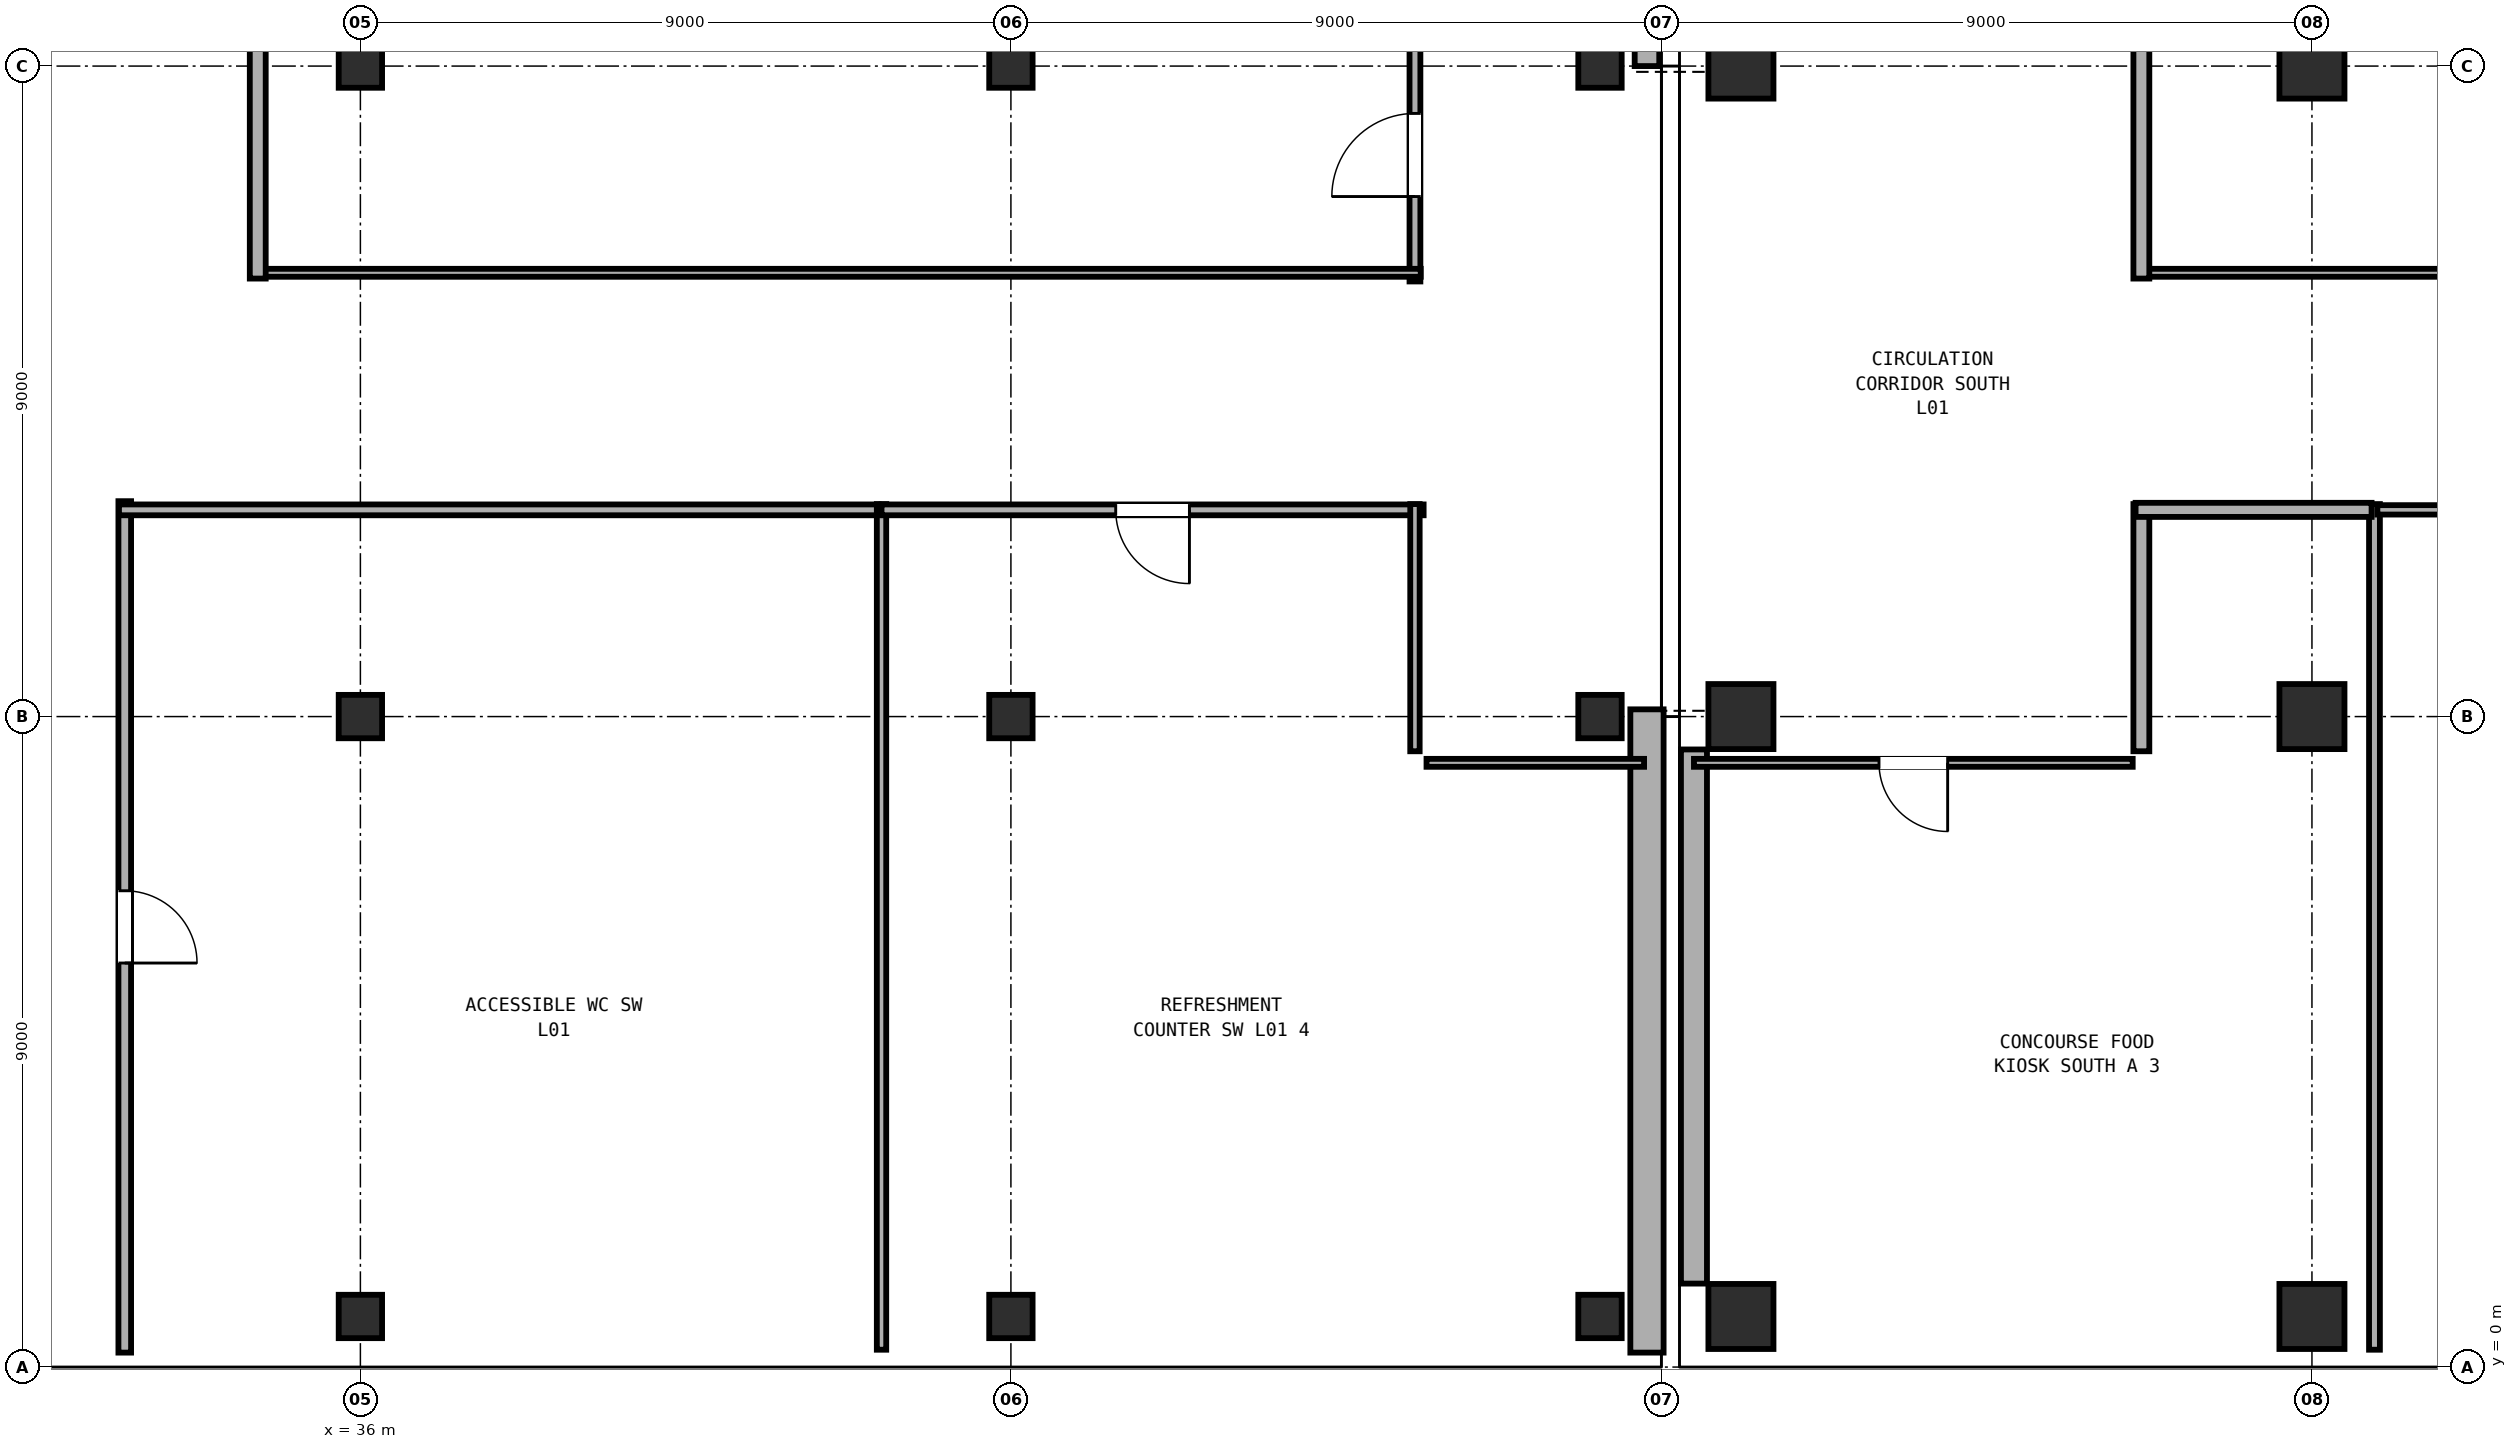
"""IFC4 building model, lengths in metres.
Left out: names, types, materials, properties, quantities, classifications, styles, units other than length and angle.
Written with IfcOpenShell. Run it as: python <this file> out.ifc"""

import sys

from ifc_helpers import new_model, si_unit, direction, frame, frame_2d, origin, origin_2d, place, context, subcontext, project, spatial, rectangle, extrude, element, fill, save


model = new_model("IFC4")
c1 = context("Model", 3, precision=1e-05, world=origin(), true_north=direction((0.0, 1.0)))
c2 = subcontext(c1, "Body", "Model", "MODEL_VIEW")
j1 = project(units=[si_unit("LENGTHUNIT", "METRE"), si_unit("PLANEANGLEUNIT", "RADIAN")], contexts=[c1])
p1 = place(None, origin())
s1 = spatial("IfcSite", under=j1, at=p1, CompositionType="ELEMENT")
p2 = place(p1, origin())
s2 = spatial("IfcBuilding", under=s1, at=p2, CompositionType="ELEMENT")
p3 = place(p2, frame((0.0, 0.0, 4.8)))
s3 = spatial("IfcBuildingStorey", under=s2, at=p3, CompositionType="ELEMENT", Elevation=4.8)
for number, where, z_axis, x_axis in (
    (1, (55.1, 0.7, 0.0), (0.0, 0.0, 1.0), (1.0, 0.0, 0.0)),
    (2, (55.1, 9.0, 0.0), (0.0, 0.0, 1.0), (1.0, 0.0, 0.0)),
    (3, (55.1, 18.0, 0.0), (0.0, 0.0, 1.0), (1.0, 0.0, 0.0)),
    (4, (63.0, 0.7, 0.0), (0.0, 0.0, 1.0), (1.0, 0.0, 0.0)),
    (5, (63.0, 9.0, 0.0), (0.0, 0.0, 1.0), (1.0, 0.0, 0.0)),
    (6, (63.0, 18.0, 0.0), (0.0, 0.0, 1.0), (1.0, 0.0, 0.0)),
):
    element("IfcColumn", number, at=place(p3, frame(where, z_axis=z_axis, x_axis=x_axis)), inside=s3, PredefinedType="COLUMN", context=c2, shape_type="SweptSolid", body=[
        extrude(rectangle(XDim=0.9, YDim=0.9, at=origin_2d()), origin(), (0.0, 0.0, 1.0), 4.8),
    ])
for number, where, z_axis, x_axis in (
    (7, (36.0, 0.7, 0.0), (0.0, 0.0, 1.0), (1.0, 0.0, 0.0)),
    (8, (36.0, 9.0, 0.0), (0.0, 0.0, 1.0), (1.0, 0.0, 0.0)),
    (9, (36.0, 18.0, 0.0), (0.0, 0.0, 1.0), (1.0, 0.0, 0.0)),
    (10, (45.0, 0.7, 0.0), (0.0, 0.0, 1.0), (1.0, 0.0, 0.0)),
    (11, (45.0, 9.0, 0.0), (0.0, 0.0, 1.0), (1.0, 0.0, 0.0)),
    (12, (45.0, 18.0, 0.0), (0.0, 0.0, 1.0), (1.0, 0.0, 0.0)),
    (13, (53.15, 0.7, 0.0), (0.0, 0.0, 1.0), (1.0, 0.0, 0.0)),
    (14, (53.15, 9.0, 0.0), (0.0, 0.0, 1.0), (1.0, 0.0, 0.0)),
    (15, (53.15, 18.0, 0.0), (0.0, 0.0, 1.0), (1.0, 0.0, 0.0)),
):
    element("IfcColumn", number, at=place(p3, frame(where, z_axis=z_axis, x_axis=x_axis)), inside=s3, PredefinedType="COLUMN", context=c2, shape_type="SweptSolid", body=[
        extrude(rectangle(XDim=0.6, YDim=0.6, at=origin_2d()), origin(), (0.0, 0.0, 1.0), 4.8),
    ])
p4 = place(p3, frame((54.45, 1.155, 0.0), z_axis=(0.0, 0.0, 1.0), x_axis=(0.0, 1.0, 0.0)))
e16 = element("IfcWall", 16, at=p4, inside=s3, PredefinedType="SOLIDWALL", context=c2, shape_type="SweptSolid", body=[
    extrude(rectangle(XDim=7.39, YDim=0.36, at=frame_2d((3.695, 0.0))), origin(), (0.0, 0.0, 1.0), 3.28),
])
p5 = place(p3, frame((71.545, 0.2, 0.0), z_axis=(0.0, 0.0, 1.0), x_axis=(-1.0, 0.0, 0.0)))
e17 = element("IfcWall", 17, at=p5, inside=s3, PredefinedType="SOLIDWALL", context=c2, shape_type="SweptSolid", body=[
    extrude(rectangle(XDim=8.09, YDim=0.4, at=frame_2d((4.045, 0.0))), origin(), (0.0, 0.0, 1.0), 3.58),
])
p6 = place(p5, frame((3.22, 0.0, 0.9)))
e18 = element("IfcOpeningElement", 18, at=p6, cuts=e17, PredefinedType="OPENING", context=c2, shape_type="SweptSolid", body=[
    extrude(rectangle(XDim=1.65, YDim=1.9, at=frame_2d((0.825, 0.95))), frame((0.0, 0.21, 0.0), z_axis=(0.0, -1.0, 0.0), x_axis=(1.0, 0.0, 0.0)), (0.0, 0.0, 1.0), 0.42),
])
p7 = place(p3, frame((62.545, 0.2, 0.0), z_axis=(0.0, 0.0, 1.0), x_axis=(-1.0, 0.0, 0.0)))
e19 = element("IfcWall", 19, at=p7, inside=s3, PredefinedType="SOLIDWALL", context=c2, shape_type="SweptSolid", body=[
    extrude(rectangle(XDim=6.99, YDim=0.38, at=frame_2d((3.495, 0.0))), origin(), (0.0, 0.0, 1.0), 3.58),
])
p8 = place(p7, frame((2.57, 0.0, 0.9)))
e20 = element("IfcOpeningElement", 20, at=p8, cuts=e19, PredefinedType="OPENING", context=c2, shape_type="SweptSolid", body=[
    extrude(rectangle(XDim=1.85, YDim=1.95, at=frame_2d((0.925, 0.975))), frame((0.0, 0.2, 0.0), z_axis=(0.0, -1.0, 0.0), x_axis=(1.0, 0.0, 0.0)), (0.0, 0.0, 1.0), 0.4),
])
p9 = place(p3, frame((53.8, 26.9, 0.0), z_axis=(0.0, 0.0, 1.0), x_axis=(0.0, -1.0, 0.0)))
e21 = element("IfcWall", 21, at=p9, inside=s3, PredefinedType="SOLIDWALL", context=c2, shape_type="SweptSolid", body=[
    extrude(rectangle(XDim=8.9, YDim=0.34, at=frame_2d((4.45, 0.0))), origin(), (0.0, 0.0, 1.0), 3.28),
])
p10 = place(p3, frame((53.8, 9.1, 0.0), z_axis=(0.0, 0.0, 1.0), x_axis=(0.0, -1.0, 0.0)))
e22 = element("IfcWall", 22, at=p10, inside=s3, PredefinedType="SOLIDWALL", context=c2, shape_type="SweptSolid", body=[
    extrude(rectangle(XDim=8.9, YDim=0.46, at=frame_2d((4.45, 0.0))), origin(), (0.0, 0.0, 1.0), 3.28),
])
p11 = place(p3, frame((52.845, 0.2, 0.0), z_axis=(0.0, 0.0, 1.0), x_axis=(-1.0, 0.0, 0.0)))
e23 = element("IfcWall", 23, at=p11, inside=s3, PredefinedType="SOLIDWALL", context=c2, shape_type="SweptSolid", body=[
    extrude(rectangle(XDim=7.54, YDim=0.42, at=frame_2d((3.77, 0.0))), origin(), (0.0, 0.0, 1.0), 3.28),
])
p12 = place(p3, frame((44.695, 0.2, 0.0), z_axis=(0.0, 0.0, 1.0), x_axis=(-1.0, 0.0, 0.0)))
e24 = element("IfcWall", 24, at=p12, inside=s3, PredefinedType="SOLIDWALL", context=c2, shape_type="SweptSolid", body=[
    extrude(rectangle(XDim=8.39, YDim=0.4, at=frame_2d((4.195, 0.0))), origin(), (0.0, 0.0, 1.0), 3.28),
])
p13 = place(p3, frame((35.695, 0.2, 0.0), z_axis=(0.0, 0.0, 1.0), x_axis=(-1.0, 0.0, 0.0)))
e25 = element("IfcWall", 25, at=p13, inside=s3, PredefinedType="SOLIDWALL", context=c2, shape_type="SweptSolid", body=[
    extrude(rectangle(XDim=8.39, YDim=0.38, at=frame_2d((4.195, 0.0))), origin(), (0.0, 0.0, 1.0), 3.58),
])
p14 = place(p13, frame((3.57, 0.0, 0.9)))
e26 = element("IfcOpeningElement", 26, at=p14, cuts=e25, PredefinedType="OPENING", context=c2, shape_type="SweptSolid", body=[
    extrude(rectangle(XDim=1.25, YDim=1.8, at=frame_2d((0.625, 0.9))), frame((0.0, 0.2, 0.0), z_axis=(0.0, -1.0, 0.0), x_axis=(1.0, 0.0, 0.0)), (0.0, 0.0, 1.0), 0.4),
])
p15 = place(p3, frame((73.24, 15.14, 0.0), z_axis=(0.0, 0.0, 1.0), x_axis=(-1.0, 0.0, 0.0)))
e27 = element("IfcWall", 27, at=p15, inside=s3, PredefinedType="PARTITIONING", context=c2, shape_type="SweptSolid", body=[
    extrude(rectangle(XDim=12.68, YDim=0.11, at=frame_2d((6.34, 0.0))), origin(), (0.0, 0.0, 1.0), 3.28),
])
p16 = place(p3, frame((60.64, 15.06, 0.0), z_axis=(0.0, 0.0, 1.0), x_axis=(0.0, 1.0, 0.0)))
e28 = element("IfcWall", 28, at=p16, inside=s3, PredefinedType="PARTITIONING", context=c2, shape_type="SweptSolid", body=[
    extrude(rectangle(XDim=20.7, YDim=0.22, at=frame_2d((10.35, 0.0))), origin(), (0.0, 0.0, 1.0), 3.28),
])
p17 = place(p3, frame((63.865, 0.24, 0.0), z_axis=(0.0, 0.0, 1.0), x_axis=(0.0, 1.0, 0.0)))
e29 = element("IfcWall", 29, at=p17, inside=s3, PredefinedType="PARTITIONING", context=c2, shape_type="SweptSolid", body=[
    extrude(rectangle(XDim=11.7, YDim=0.15, at=frame_2d((5.85, 0.0))), origin(), (0.0, 0.0, 1.0), 3.28),
])
p18 = place(p3, frame((63.905, 11.86, 0.0), z_axis=(0.0, 0.0, 1.0), x_axis=(1.0, 0.0, 0.0)))
e30 = element("IfcWall", 30, at=p18, inside=s3, PredefinedType="PARTITIONING", context=c2, shape_type="SweptSolid", body=[
    extrude(rectangle(XDim=9.335, YDim=0.13, at=frame_2d((4.667, 0.0))), origin(), (0.0, 0.0, 1.0), 3.28),
])
p19 = place(p3, frame((60.52, 8.36, 0.0), z_axis=(0.0, 0.0, 1.0), x_axis=(-1.0, 0.0, 0.0)))
e31 = element("IfcWall", 31, at=p19, inside=s3, PredefinedType="PARTITIONING", context=c2, shape_type="SweptSolid", body=[
    extrude(rectangle(XDim=6.07, YDim=0.11, at=frame_2d((3.035, 0.0))), origin(), (0.0, 0.0, 1.0), 3.28),
])
p20 = place(p19, frame((2.56, 0.0, 0.0)))
e32 = element("IfcOpeningElement", 32, at=p20, cuts=e31, PredefinedType="OPENING", context=c2, shape_type="SweptSolid", body=[
    extrude(rectangle(XDim=0.95, YDim=2.18, at=frame_2d((0.475, 1.09))), frame((0.0, 0.065, 0.0), z_axis=(0.0, -1.0, 0.0), x_axis=(1.0, 0.0, 0.0)), (0.0, 0.0, 1.0), 0.13),
])
p21 = place(p3, frame((60.64, 8.52, 0.0), z_axis=(0.0, 0.0, 1.0), x_axis=(0.0, 1.0, 0.0)))
e33 = element("IfcWall", 33, at=p21, inside=s3, PredefinedType="PARTITIONING", context=c2, shape_type="SweptSolid", body=[
    extrude(rectangle(XDim=3.42, YDim=0.22, at=frame_2d((1.71, 0.0))), origin(), (0.0, 0.0, 1.0), 3.28),
])
p22 = place(p3, frame((60.56, 11.86, 0.0), z_axis=(0.0, 0.0, 1.0), x_axis=(1.0, 0.0, 0.0)))
e34 = element("IfcWall", 34, at=p22, inside=s3, PredefinedType="PARTITIONING", context=c2, shape_type="SweptSolid", body=[
    extrude(rectangle(XDim=3.265, YDim=0.195, at=frame_2d((1.632, 0.0))), origin(), (0.0, 0.0, 1.0), 3.28),
])
p23 = place(p3, frame((50.59, 15.02, 0.0), z_axis=(0.0, 0.0, 1.0), x_axis=(0.0, 1.0, 0.0)))
e35 = element("IfcWall", 35, at=p23, inside=s3, PredefinedType="PARTITIONING", context=c2, shape_type="SweptSolid", body=[
    extrude(rectangle(XDim=3.5, YDim=0.15, at=frame_2d((1.75, 0.0))), origin(), (0.0, 0.0, 1.0), 3.28),
])
p24 = place(p23, frame((1.175, 0.0, 0.0)))
e36 = element("IfcOpeningElement", 36, at=p24, cuts=e35, PredefinedType="OPENING", context=c2, shape_type="SweptSolid", body=[
    extrude(rectangle(XDim=1.15, YDim=2.15, at=frame_2d((0.575, 1.075))), frame((0.0, 0.085, 0.0), z_axis=(0.0, -1.0, 0.0), x_axis=(1.0, 0.0, 0.0)), (0.0, 0.0, 1.0), 0.17),
])
p25 = place(p3, frame((50.67, 15.14, 0.0), z_axis=(0.0, 0.0, 1.0), x_axis=(-1.0, 0.0, 0.0)))
e37 = element("IfcWall", 37, at=p25, inside=s3, PredefinedType="PARTITIONING", context=c2, shape_type="SweptSolid", body=[
    extrude(rectangle(XDim=16.17, YDim=0.11, at=frame_2d((8.085, 0.0))), origin(), (0.0, 0.0, 1.0), 3.28),
])
p26 = place(p3, frame((34.58, 15.06, 0.0), z_axis=(0.0, 0.0, 1.0), x_axis=(0.0, 1.0, 0.0)))
e38 = element("IfcWall", 38, at=p26, inside=s3, PredefinedType="PARTITIONING", context=c2, shape_type="SweptSolid", body=[
    extrude(rectangle(XDim=4.413, YDim=0.22, at=frame_2d((2.207, 0.0))), origin(), (0.0, 0.0, 1.0), 3.28),
])
p27 = place(p3, frame((32.74, 11.98, 0.0), z_axis=(0.0, 0.0, 1.0), x_axis=(0.0, -1.0, 0.0)))
e39 = element("IfcWall", 39, at=p27, inside=s3, PredefinedType="PARTITIONING", context=c2, shape_type="SweptSolid", body=[
    extrude(rectangle(XDim=11.78, YDim=0.175, at=frame_2d((5.89, 0.0))), origin(), (0.0, 0.0, 1.0), 3.28),
])
p28 = place(p27, frame((5.39, 0.0, 0.0)))
e40 = element("IfcOpeningElement", 40, at=p28, cuts=e39, PredefinedType="OPENING", context=c2, shape_type="SweptSolid", body=[
    extrude(rectangle(XDim=1.0, YDim=2.1, at=frame_2d((0.5, 1.05))), frame((0.0, 0.097, 0.0), z_axis=(0.0, -1.0, 0.0), x_axis=(1.0, 0.0, 0.0)), (0.0, 0.0, 1.0), 0.195),
])
p29 = place(p3, frame((32.66, 11.86, 0.0), z_axis=(0.0, 0.0, 1.0), x_axis=(1.0, 0.0, 0.0)))
e41 = element("IfcWall", 41, at=p29, inside=s3, PredefinedType="PARTITIONING", context=c2, shape_type="SweptSolid", body=[
    extrude(rectangle(XDim=10.51, YDim=0.15, at=frame_2d((5.255, 0.0))), origin(), (0.0, 0.0, 1.0), 3.28),
])
p30 = place(p3, frame((43.21, 11.94, 0.0), z_axis=(0.0, 0.0, 1.0), x_axis=(0.0, -1.0, 0.0)))
e42 = element("IfcWall", 42, at=p30, inside=s3, PredefinedType="PARTITIONING", context=c2, shape_type="SweptSolid", body=[
    extrude(rectangle(XDim=11.7, YDim=0.13, at=frame_2d((5.85, 0.0))), origin(), (0.0, 0.0, 1.0), 3.28),
])
p31 = place(p3, frame((50.71, 11.86, 0.0), z_axis=(0.0, 0.0, 1.0), x_axis=(-1.0, 0.0, 0.0)))
e43 = element("IfcWall", 43, at=p31, inside=s3, PredefinedType="PARTITIONING", context=c2, shape_type="SweptSolid", body=[
    extrude(rectangle(XDim=7.5, YDim=0.15, at=frame_2d((3.75, 0.0))), origin(), (0.0, 0.0, 1.0), 3.28),
])
p32 = place(p31, frame((3.24, 0.0, 0.0)))
e44 = element("IfcOpeningElement", 44, at=p32, cuts=e43, PredefinedType="OPENING", context=c2, shape_type="SweptSolid", body=[
    extrude(rectangle(XDim=1.02, YDim=2.16, at=frame_2d((0.51, 1.08))), frame((0.0, 0.085, 0.0), z_axis=(0.0, -1.0, 0.0), x_axis=(1.0, 0.0, 0.0)), (0.0, 0.0, 1.0), 0.17),
])
p33 = place(p3, frame((50.59, 11.94, 0.0), z_axis=(0.0, 0.0, 1.0), x_axis=(0.0, -1.0, 0.0)))
e45 = element("IfcWall", 45, at=p33, inside=s3, PredefinedType="PARTITIONING", context=c2, shape_type="SweptSolid", body=[
    extrude(rectangle(XDim=3.42, YDim=0.13, at=frame_2d((1.71, 0.0))), origin(), (0.0, 0.0, 1.0), 3.28),
])
p34 = place(p3, frame((50.75, 8.36, 0.0), z_axis=(0.0, 0.0, 1.0), x_axis=(1.0, 0.0, 0.0)))
e46 = element("IfcWall", 46, at=p34, inside=s3, PredefinedType="PARTITIONING", context=c2, shape_type="SweptSolid", body=[
    extrude(rectangle(XDim=3.01, YDim=0.11, at=frame_2d((1.505, 0.0))), origin(), (0.0, 0.0, 1.0), 3.28),
])
p35 = place(p8, origin())
e47 = element("IfcWindow", 47, at=p35, inside=s3, PartitioningType="DOUBLE_PANEL_VERTICAL", PredefinedType="WINDOW", context=c2, shape_type="SweptSolid", body=[
    extrude(rectangle(XDim=1.85, YDim=1.95, at=frame_2d((0.925, 0.975))), frame((0.0, 0.03, 0.0), z_axis=(0.0, -1.0, 0.0), x_axis=(1.0, 0.0, 0.0)), (0.0, 0.0, 1.0), 0.06),
])
fill(e20, e47)
p36 = place(p14, origin())
e48 = element("IfcWindow", 48, at=p36, inside=s3, PartitioningType="SINGLE_PANEL", PredefinedType="WINDOW", context=c2, shape_type="SweptSolid", body=[
    extrude(rectangle(XDim=1.25, YDim=1.8, at=frame_2d((0.625, 0.9))), frame((0.0, 0.03, 0.0), z_axis=(0.0, -1.0, 0.0), x_axis=(1.0, 0.0, 0.0)), (0.0, 0.0, 1.0), 0.06),
])
fill(e26, e48)
p37 = place(p20, origin())
e49 = element("IfcDoor", 49, at=p37, inside=s3, OperationType="SINGLE_SWING_LEFT", PredefinedType="DOOR", context=c2, shape_type="SweptSolid", body=[
    extrude(rectangle(XDim=0.95, YDim=2.18, at=frame_2d((0.475, 1.09))), frame((0.0, 0.025, 0.0), z_axis=(0.0, -1.0, 0.0), x_axis=(1.0, 0.0, 0.0)), (0.0, 0.0, 1.0), 0.05),
])
fill(e32, e49)
p38 = place(p24, origin())
e50 = element("IfcDoor", 50, at=p38, inside=s3, OperationType="SINGLE_SWING_LEFT", PredefinedType="DOOR", context=c2, shape_type="SweptSolid", body=[
    extrude(rectangle(XDim=1.15, YDim=2.15, at=frame_2d((0.575, 1.075))), frame((0.0, 0.025, 0.0), z_axis=(0.0, -1.0, 0.0), x_axis=(1.0, 0.0, 0.0)), (0.0, 0.0, 1.0), 0.05),
])
fill(e36, e50)
p39 = place(p28, origin())
e51 = element("IfcDoor", 51, at=p39, inside=s3, OperationType="SINGLE_SWING_RIGHT", PredefinedType="DOOR", context=c2, shape_type="SweptSolid", body=[
    extrude(rectangle(XDim=1.0, YDim=2.1, at=frame_2d((0.5, 1.05))), frame((0.0, 0.025, 0.0), z_axis=(0.0, -1.0, 0.0), x_axis=(1.0, 0.0, 0.0)), (0.0, 0.0, 1.0), 0.05),
])
fill(e40, e51)
p40 = place(p32, origin())
e52 = element("IfcDoor", 52, at=p40, inside=s3, OperationType="SINGLE_SWING_LEFT", PredefinedType="DOOR", context=c2, shape_type="SweptSolid", body=[
    extrude(rectangle(XDim=1.02, YDim=2.16, at=frame_2d((0.51, 1.08))), frame((0.0, 0.025, 0.0), z_axis=(0.0, -1.0, 0.0), x_axis=(1.0, 0.0, 0.0)), (0.0, 0.0, 1.0), 0.05),
])
fill(e44, e52)
save(model, sys.argv[1])
